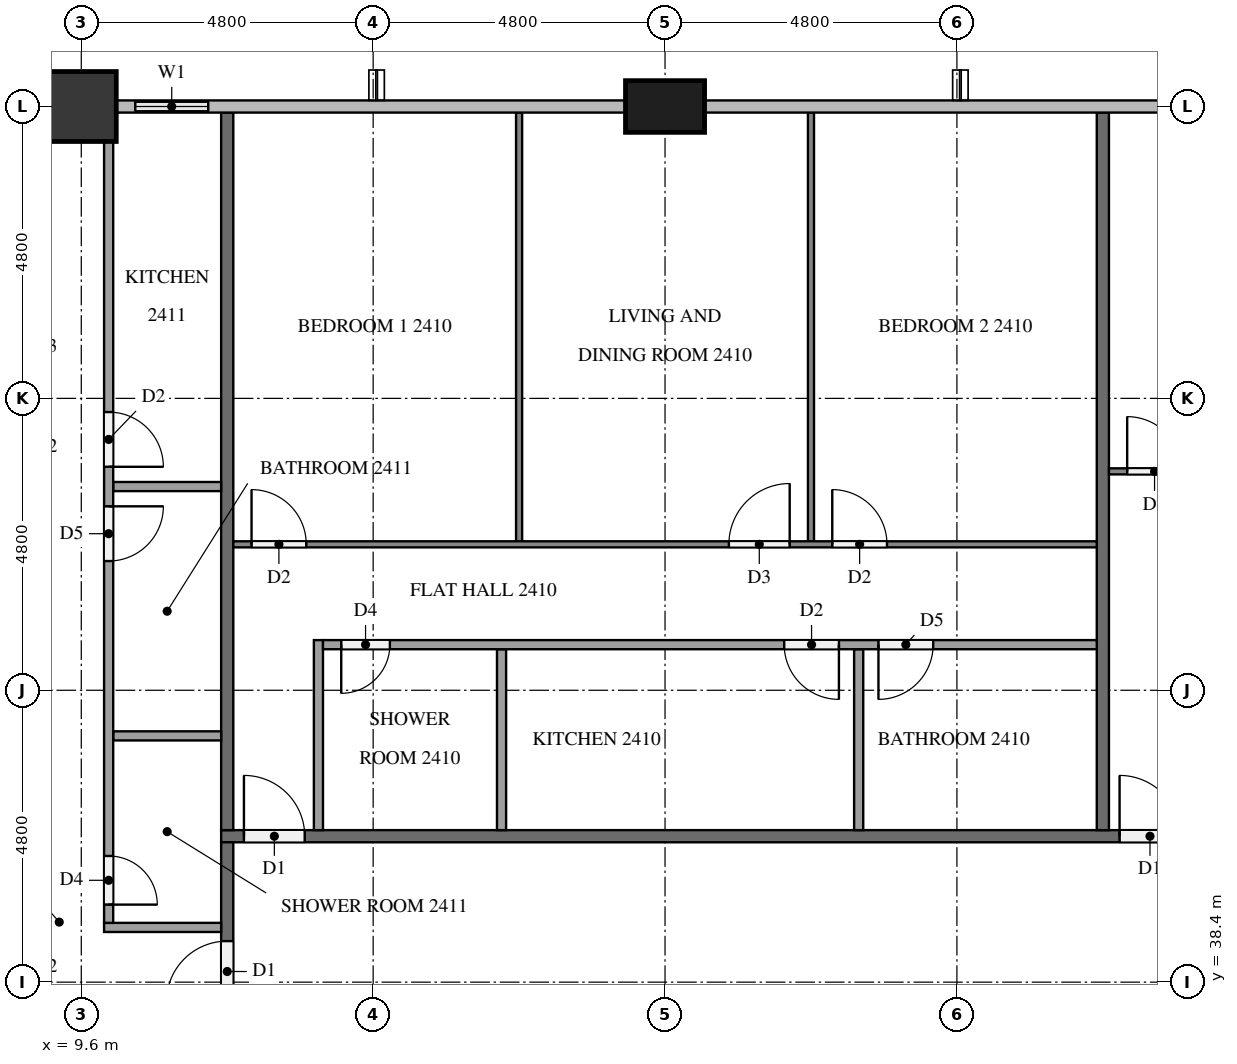
"""IFC4 building model, lengths in metres.
Left out: names, types, materials, properties, quantities, classifications, styles, units other than length and angle.
Written with IfcOpenShell. Run it as: python <this file> out.ifc"""

import sys

from ifc_helpers import new_model, si_unit, direction, frame, frame_2d, origin, origin_2d, place, context, subcontext, project, spatial, rectangle, extrude, element, fill, save


model = new_model("IFC4")
c1 = context("Model", 3, precision=1e-05, world=origin(), true_north=direction((0.0, 1.0)))
c2 = subcontext(c1, "Body", "Model", "MODEL_VIEW")
j1 = project(units=[si_unit("LENGTHUNIT", "METRE"), si_unit("PLANEANGLEUNIT", "RADIAN")], contexts=[c1])
p1 = place(None, origin())
s1 = spatial("IfcSite", under=j1, at=p1, CompositionType="ELEMENT")
p2 = place(p1, origin())
s2 = spatial("IfcBuilding", under=s1, at=p2, CompositionType="ELEMENT")
p3 = place(p2, frame((0.0, 0.0, 96.2)))
s3 = spatial("IfcBuildingStorey", under=s2, at=p3, CompositionType="ELEMENT", Elevation=96.2)
p4 = place(p3, frame((19.2, 52.8, 0.0), z_axis=(0.0, 0.0, 1.0), x_axis=(1.0, 0.0, 0.0)))
e1 = element("IfcColumn", 1, at=p4, inside=s3, PredefinedType="COLUMN", context=c2, shape_type="SweptSolid", body=[
    extrude(rectangle(XDim=1.3, YDim=0.85, at=origin_2d()), origin(), (0.0, 0.0, 1.0), 3.2),
])
p5 = place(p3, frame((9.6, 52.8, 0.0), z_axis=(0.0, 0.0, 1.0), x_axis=(1.0, 0.0, 0.0)))
e2 = element("IfcColumn", 2, at=p5, inside=s3, PredefinedType="COLUMN", context=c2, shape_type="SweptSolid", body=[
    extrude(rectangle(XDim=1.15, YDim=1.15, at=origin_2d()), origin(), (0.0, 0.0, 1.0), 3.2),
])
p6 = place(p3, frame((12.0, 52.8, 0.0), z_axis=(0.0, 0.0, 1.0), x_axis=(-1.0, 0.0, 0.0)))
e3 = element("IfcWall", 3, at=p6, inside=s3, PredefinedType="SOLIDWALL", context=c2, shape_type="SweptSolid", body=[
    extrude(rectangle(XDim=1.825, YDim=0.15, at=frame_2d((0.913, 0.0))), origin(), (0.0, 0.0, 1.0), 3.2),
])
p7 = place(p6, frame((0.312, 0.0, 0.9)))
e4 = element("IfcOpeningElement", 4, at=p7, cuts=e3, PredefinedType="OPENING", context=c2, shape_type="SweptSolid", body=[
    extrude(rectangle(XDim=1.2, YDim=1.4, at=frame_2d((0.6, 0.7))), frame((0.0, 0.085, 0.0), z_axis=(0.0, -1.0, 0.0), x_axis=(1.0, 0.0, 0.0)), (0.0, 0.0, 1.0), 0.17),
])
p8 = place(p3, frame((11.9, 40.8, 0.0), z_axis=(0.0, 0.0, 1.0), x_axis=(1.0, 0.0, 0.0)))
e5 = element("IfcWall", 5, at=p8, inside=s3, PredefinedType="PARTITIONING", context=c2, shape_type="SweptSolid", body=[
    extrude(rectangle(XDim=38.6, YDim=0.2, at=frame_2d((19.3, 0.0))), origin(), (0.0, 0.0, 1.0), 3.2),
])
p9 = place(p8, frame((31.575, 0.0, 0.0)))
e6 = element("IfcOpeningElement", 6, at=p9, cuts=e5, PredefinedType="OPENING", context=c2, shape_type="SweptSolid", body=[
    extrude(rectangle(XDim=1.0, YDim=2.1, at=frame_2d((0.5, 1.05))), frame((0.0, 0.11, 0.0), z_axis=(0.0, -1.0, 0.0), x_axis=(1.0, 0.0, 0.0)), (0.0, 0.0, 1.0), 0.22),
])
p10 = place(p8, frame((14.775, 0.0, 0.0)))
e7 = element("IfcOpeningElement", 7, at=p10, cuts=e5, PredefinedType="OPENING", context=c2, shape_type="SweptSolid", body=[
    extrude(rectangle(XDim=1.0, YDim=2.1, at=frame_2d((0.5, 1.05))), frame((0.0, 0.11, 0.0), z_axis=(0.0, -1.0, 0.0), x_axis=(1.0, 0.0, 0.0)), (0.0, 0.0, 1.0), 0.22),
])
p11 = place(p8, frame((0.375, 0.0, 0.0)))
e8 = element("IfcOpeningElement", 8, at=p11, cuts=e5, PredefinedType="OPENING", context=c2, shape_type="SweptSolid", body=[
    extrude(rectangle(XDim=1.0, YDim=2.1, at=frame_2d((0.5, 1.05))), frame((0.0, 0.11, 0.0), z_axis=(0.0, -1.0, 0.0), x_axis=(1.0, 0.0, 0.0)), (0.0, 0.0, 1.0), 0.22),
])
p12 = place(p3, frame((12.0, 37.9, 0.0), z_axis=(0.0, 0.0, 1.0), x_axis=(0.0, 1.0, 0.0)))
e9 = element("IfcWall", 9, at=p12, inside=s3, PredefinedType="PARTITIONING", context=c2, shape_type="SweptSolid", body=[
    extrude(rectangle(XDim=2.8, YDim=0.2, at=frame_2d((1.4, 0.0))), origin(), (0.0, 0.0, 1.0), 3.2),
])
p13 = place(p12, frame((0.175, 0.0, 0.0)))
e10 = element("IfcOpeningElement", 10, at=p13, cuts=e9, PredefinedType="OPENING", context=c2, shape_type="SweptSolid", body=[
    extrude(rectangle(XDim=1.0, YDim=2.1, at=frame_2d((0.5, 1.05))), frame((0.0, 0.11, 0.0), z_axis=(0.0, -1.0, 0.0), x_axis=(1.0, 0.0, 0.0)), (0.0, 0.0, 1.0), 0.22),
])
for number, where, z_axis, x_axis in (
    (11, (26.4, 52.7, 0.0), (0.0, 0.0, 1.0), (0.0, -1.0, 0.0)),
    (12, (12.0, 52.7, 0.0), (0.0, 0.0, 1.0), (0.0, -1.0, 0.0)),
):
    element("IfcWall", number, at=place(p3, frame(where, z_axis=z_axis, x_axis=x_axis)), inside=s3, PredefinedType="PARTITIONING", context=c2, shape_type="SweptSolid", body=[
        extrude(rectangle(XDim=11.8, YDim=0.2, at=frame_2d((5.9, 0.0))), origin(), (0.0, 0.0, 1.0), 3.2),
    ])
p14 = place(p3, frame((26.5, 46.8, 0.0), z_axis=(0.0, 0.0, 1.0), x_axis=(1.0, 0.0, 0.0)))
e13 = element("IfcWall", 13, at=p14, inside=s3, PredefinedType="PARTITIONING", context=c2, shape_type="SweptSolid", body=[
    extrude(rectangle(XDim=16.6, YDim=0.1, at=frame_2d((8.3, 0.0))), origin(), (0.0, 0.0, 1.0), 3.2),
])
p15 = place(p14, frame((0.3, 0.0, 0.0)))
e14 = element("IfcOpeningElement", 14, at=p15, cuts=e13, PredefinedType="OPENING", context=c2, shape_type="SweptSolid", body=[
    extrude(rectangle(XDim=0.9, YDim=2.1, at=frame_2d((0.45, 1.05))), frame((0.0, 0.06, 0.0), z_axis=(0.0, -1.0, 0.0), x_axis=(1.0, 0.0, 0.0)), (0.0, 0.0, 1.0), 0.12),
])
p16 = place(p14, frame((8.25, 0.0, 0.0)))
e15 = element("IfcOpeningElement", 15, at=p16, cuts=e13, PredefinedType="OPENING", context=c2, shape_type="SweptSolid", body=[
    extrude(rectangle(XDim=0.9, YDim=2.1, at=frame_2d((0.45, 1.05))), frame((0.0, 0.06, 0.0), z_axis=(0.0, -1.0, 0.0), x_axis=(1.0, 0.0, 0.0)), (0.0, 0.0, 1.0), 0.12),
])
p17 = place(p14, frame((9.85, 0.0, 0.0)))
e16 = element("IfcOpeningElement", 16, at=p17, cuts=e13, PredefinedType="OPENING", context=c2, shape_type="SweptSolid", body=[
    extrude(rectangle(XDim=1.0, YDim=2.1, at=frame_2d((0.5, 1.05))), frame((0.0, 0.06, 0.0), z_axis=(0.0, -1.0, 0.0), x_axis=(1.0, 0.0, 0.0)), (0.0, 0.0, 1.0), 0.12),
])
for number, where, z_axis, x_axis in (
    (17, (16.8, 45.65, 0.0), (0.0, 0.0, 1.0), (0.0, 1.0, 0.0)),
    (18, (21.6, 45.65, 0.0), (0.0, 0.0, 1.0), (0.0, 1.0, 0.0)),
):
    element("IfcWall", number, at=place(p3, frame(where, z_axis=z_axis, x_axis=x_axis)), inside=s3, PredefinedType="PARTITIONING", context=c2, shape_type="SweptSolid", body=[
        extrude(rectangle(XDim=7.05, YDim=0.1, at=frame_2d((3.525, 0.0))), origin(), (0.0, 0.0, 1.0), 3.2),
    ])
p18 = place(p3, frame((12.1, 45.6, 0.0), z_axis=(0.0, 0.0, 1.0), x_axis=(1.0, 0.0, 0.0)))
e19 = element("IfcWall", 19, at=p18, inside=s3, PredefinedType="PARTITIONING", context=c2, shape_type="SweptSolid", body=[
    extrude(rectangle(XDim=14.2, YDim=0.1, at=frame_2d((7.1, 0.0))), origin(), (0.0, 0.0, 1.0), 3.2),
])
p19 = place(p18, frame((0.3, 0.0, 0.0)))
e20 = element("IfcOpeningElement", 20, at=p19, cuts=e19, PredefinedType="OPENING", context=c2, shape_type="SweptSolid", body=[
    extrude(rectangle(XDim=0.9, YDim=2.1, at=frame_2d((0.45, 1.05))), frame((0.0, 0.06, 0.0), z_axis=(0.0, -1.0, 0.0), x_axis=(1.0, 0.0, 0.0)), (0.0, 0.0, 1.0), 0.12),
])
p20 = place(p18, frame((8.15, 0.0, 0.0)))
e21 = element("IfcOpeningElement", 21, at=p20, cuts=e19, PredefinedType="OPENING", context=c2, shape_type="SweptSolid", body=[
    extrude(rectangle(XDim=1.0, YDim=2.1, at=frame_2d((0.5, 1.05))), frame((0.0, 0.06, 0.0), z_axis=(0.0, -1.0, 0.0), x_axis=(1.0, 0.0, 0.0)), (0.0, 0.0, 1.0), 0.12),
])
p21 = place(p18, frame((9.85, 0.0, 0.0)))
e22 = element("IfcOpeningElement", 22, at=p21, cuts=e19, PredefinedType="OPENING", context=c2, shape_type="SweptSolid", body=[
    extrude(rectangle(XDim=0.9, YDim=2.1, at=frame_2d((0.45, 1.05))), frame((0.0, 0.06, 0.0), z_axis=(0.0, -1.0, 0.0), x_axis=(1.0, 0.0, 0.0)), (0.0, 0.0, 1.0), 0.12),
])
for number, where, z_axis, x_axis in (
    (23, (16.511, 40.9, 0.0), (0.0, 0.0, 1.0), (0.0, 1.0, 0.0)),
    (24, (22.385, 40.9, 0.0), (0.0, 0.0, 1.0), (0.0, 1.0, 0.0)),
):
    element("IfcWall", number, at=place(p3, frame(where, z_axis=z_axis, x_axis=x_axis)), inside=s3, PredefinedType="PARTITIONING", context=c2, shape_type="SweptSolid", body=[
        extrude(rectangle(XDim=2.975, YDim=0.15, at=frame_2d((1.488, 0.0))), origin(), (0.0, 0.0, 1.0), 3.2),
    ])
p22 = place(p3, frame((13.5, 40.9, 0.0), z_axis=(0.0, 0.0, 1.0), x_axis=(0.0, 1.0, 0.0)))
e25 = element("IfcWall", 25, at=p22, inside=s3, PredefinedType="PARTITIONING", context=c2, shape_type="SweptSolid", body=[
    extrude(rectangle(XDim=3.125, YDim=0.15, at=frame_2d((1.562, 0.0))), origin(), (0.0, 0.0, 1.0), 3.2),
])
p23 = place(p3, frame((26.3, 43.95, 0.0), z_axis=(0.0, 0.0, 1.0), x_axis=(-1.0, 0.0, 0.0)))
e26 = element("IfcWall", 26, at=p23, inside=s3, PredefinedType="PARTITIONING", context=c2, shape_type="SweptSolid", body=[
    extrude(rectangle(XDim=12.725, YDim=0.15, at=frame_2d((6.363, 0.0))), origin(), (0.0, 0.0, 1.0), 3.2),
])
p24 = place(p23, frame((11.625, 0.0, 0.0)))
e27 = element("IfcOpeningElement", 27, at=p24, cuts=e26, PredefinedType="OPENING", context=c2, shape_type="SweptSolid", body=[
    extrude(rectangle(XDim=0.8, YDim=2.1, at=frame_2d((0.4, 1.05))), frame((0.0, 0.085, 0.0), z_axis=(0.0, -1.0, 0.0), x_axis=(1.0, 0.0, 0.0)), (0.0, 0.0, 1.0), 0.17),
])
p25 = place(p23, frame((4.24, 0.0, 0.0)))
e28 = element("IfcOpeningElement", 28, at=p25, cuts=e26, PredefinedType="OPENING", context=c2, shape_type="SweptSolid", body=[
    extrude(rectangle(XDim=0.9, YDim=2.1, at=frame_2d((0.45, 1.05))), frame((0.0, 0.085, 0.0), z_axis=(0.0, -1.0, 0.0), x_axis=(1.0, 0.0, 0.0)), (0.0, 0.0, 1.0), 0.17),
])
p26 = place(p23, frame((2.69, 0.0, 0.0)))
e29 = element("IfcOpeningElement", 29, at=p26, cuts=e26, PredefinedType="OPENING", context=c2, shape_type="SweptSolid", body=[
    extrude(rectangle(XDim=0.9, YDim=2.1, at=frame_2d((0.45, 1.05))), frame((0.0, 0.085, 0.0), z_axis=(0.0, -1.0, 0.0), x_axis=(1.0, 0.0, 0.0)), (0.0, 0.0, 1.0), 0.17),
])
for number, where, z_axis, x_axis in (
    (30, (11.9, 42.45, 0.0), (0.0, 0.0, 1.0), (-1.0, 0.0, 0.0)),
    (31, (11.9, 46.55, 0.0), (0.0, 0.0, 1.0), (-1.0, 0.0, 0.0)),
):
    element("IfcWall", number, at=place(p3, frame(where, z_axis=z_axis, x_axis=x_axis)), inside=s3, PredefinedType="PARTITIONING", context=c2, shape_type="SweptSolid", body=[
        extrude(rectangle(XDim=1.775, YDim=0.15, at=frame_2d((0.887, 0.0))), origin(), (0.0, 0.0, 1.0), 3.2),
    ])
p27 = place(p3, frame((11.9, 39.3, 0.0), z_axis=(0.0, 0.0, 1.0), x_axis=(-1.0, 0.0, 0.0)))
e32 = element("IfcWall", 32, at=p27, inside=s3, PredefinedType="PARTITIONING", context=c2, shape_type="SweptSolid", body=[
    extrude(rectangle(XDim=1.925, YDim=0.15, at=frame_2d((0.962, 0.0))), origin(), (0.0, 0.0, 1.0), 3.2),
])
p28 = place(p3, frame((10.05, 52.225, 0.0), z_axis=(0.0, 0.0, 1.0), x_axis=(0.0, -1.0, 0.0)))
e33 = element("IfcWall", 33, at=p28, inside=s3, PredefinedType="PARTITIONING", context=c2, shape_type="SweptSolid", body=[
    extrude(rectangle(XDim=12.85, YDim=0.15, at=frame_2d((6.425, 0.0))), origin(), (0.0, 0.0, 1.0), 3.2),
])
p29 = place(p28, frame((11.75, 0.0, 0.0)))
e34 = element("IfcOpeningElement", 34, at=p29, cuts=e33, PredefinedType="OPENING", context=c2, shape_type="SweptSolid", body=[
    extrude(rectangle(XDim=0.8, YDim=2.1, at=frame_2d((0.4, 1.05))), frame((0.0, 0.085, 0.0), z_axis=(0.0, -1.0, 0.0), x_axis=(1.0, 0.0, 0.0)), (0.0, 0.0, 1.0), 0.17),
])
p30 = place(p28, frame((6.0, 0.0, 0.0)))
e35 = element("IfcOpeningElement", 35, at=p30, cuts=e33, PredefinedType="OPENING", context=c2, shape_type="SweptSolid", body=[
    extrude(rectangle(XDim=0.9, YDim=2.1, at=frame_2d((0.45, 1.05))), frame((0.0, 0.085, 0.0), z_axis=(0.0, -1.0, 0.0), x_axis=(1.0, 0.0, 0.0)), (0.0, 0.0, 1.0), 0.17),
])
p31 = place(p28, frame((4.45, 0.0, 0.0)))
e36 = element("IfcOpeningElement", 36, at=p31, cuts=e33, PredefinedType="OPENING", context=c2, shape_type="SweptSolid", body=[
    extrude(rectangle(XDim=0.9, YDim=2.1, at=frame_2d((0.45, 1.05))), frame((0.0, 0.085, 0.0), z_axis=(0.0, -1.0, 0.0), x_axis=(1.0, 0.0, 0.0)), (0.0, 0.0, 1.0), 0.17),
])
p32 = place(p7, origin())
e37 = element("IfcWindow", 37, at=p32, inside=s3, PartitioningType="SINGLE_PANEL", PredefinedType="WINDOW", context=c2, shape_type="SweptSolid", body=[
    extrude(rectangle(XDim=1.2, YDim=1.4, at=frame_2d((0.6, 0.7))), frame((0.0, 0.03, 0.0), z_axis=(0.0, -1.0, 0.0), x_axis=(1.0, 0.0, 0.0)), (0.0, 0.0, 1.0), 0.06),
])
fill(e4, e37)
p33 = place(p10, origin())
e38 = element("IfcDoor", 38, at=p33, inside=s3, OperationType="SINGLE_SWING_LEFT", PredefinedType="DOOR", context=c2, shape_type="SweptSolid", body=[
    extrude(rectangle(XDim=1.0, YDim=2.1, at=frame_2d((0.5, 1.05))), frame((0.0, 0.025, 0.0), z_axis=(0.0, -1.0, 0.0), x_axis=(1.0, 0.0, 0.0)), (0.0, 0.0, 1.0), 0.05),
])
fill(e7, e38)
p34 = place(p11, origin())
e39 = element("IfcDoor", 39, at=p34, inside=s3, OperationType="SINGLE_SWING_LEFT", PredefinedType="DOOR", context=c2, shape_type="SweptSolid", body=[
    extrude(rectangle(XDim=1.0, YDim=2.1, at=frame_2d((0.5, 1.05))), frame((0.0, 0.025, 0.0), z_axis=(0.0, -1.0, 0.0), x_axis=(1.0, 0.0, 0.0)), (0.0, 0.0, 1.0), 0.05),
])
fill(e8, e39)
p35 = place(p13, origin())
e40 = element("IfcDoor", 40, at=p35, inside=s3, OperationType="SINGLE_SWING_LEFT", PredefinedType="DOOR", context=c2, shape_type="SweptSolid", body=[
    extrude(rectangle(XDim=1.0, YDim=2.1, at=frame_2d((0.5, 1.05))), frame((0.0, 0.025, 0.0), z_axis=(0.0, -1.0, 0.0), x_axis=(1.0, 0.0, 0.0)), (0.0, 0.0, 1.0), 0.05),
])
fill(e10, e40)
p36 = place(p15, origin())
e41 = element("IfcDoor", 41, at=p36, inside=s3, OperationType="SINGLE_SWING_LEFT", PredefinedType="DOOR", context=c2, shape_type="SweptSolid", body=[
    extrude(rectangle(XDim=0.9, YDim=2.1, at=frame_2d((0.45, 1.05))), frame((0.0, 0.025, 0.0), z_axis=(0.0, -1.0, 0.0), x_axis=(1.0, 0.0, 0.0)), (0.0, 0.0, 1.0), 0.05),
])
fill(e14, e41)
p37 = place(p19, origin())
e42 = element("IfcDoor", 42, at=p37, inside=s3, OperationType="SINGLE_SWING_LEFT", PredefinedType="DOOR", context=c2, shape_type="SweptSolid", body=[
    extrude(rectangle(XDim=0.9, YDim=2.1, at=frame_2d((0.45, 1.05))), frame((0.0, 0.025, 0.0), z_axis=(0.0, -1.0, 0.0), x_axis=(1.0, 0.0, 0.0)), (0.0, 0.0, 1.0), 0.05),
])
fill(e20, e42)
p38 = place(p20, origin())
e43 = element("IfcDoor", 43, at=p38, inside=s3, OperationType="SINGLE_SWING_RIGHT", PredefinedType="DOOR", context=c2, shape_type="SweptSolid", body=[
    extrude(rectangle(XDim=1.0, YDim=2.1, at=frame_2d((0.5, 1.05))), frame((0.0, 0.025, 0.0), z_axis=(0.0, -1.0, 0.0), x_axis=(1.0, 0.0, 0.0)), (0.0, 0.0, 1.0), 0.05),
])
fill(e21, e43)
p39 = place(p21, origin())
e44 = element("IfcDoor", 44, at=p39, inside=s3, OperationType="SINGLE_SWING_LEFT", PredefinedType="DOOR", context=c2, shape_type="SweptSolid", body=[
    extrude(rectangle(XDim=0.9, YDim=2.1, at=frame_2d((0.45, 1.05))), frame((0.0, 0.025, 0.0), z_axis=(0.0, -1.0, 0.0), x_axis=(1.0, 0.0, 0.0)), (0.0, 0.0, 1.0), 0.05),
])
fill(e22, e44)
p40 = place(p24, origin())
e45 = element("IfcDoor", 45, at=p40, inside=s3, OperationType="SINGLE_SWING_RIGHT", PredefinedType="DOOR", context=c2, shape_type="SweptSolid", body=[
    extrude(rectangle(XDim=0.8, YDim=2.1, at=frame_2d((0.4, 1.05))), frame((0.0, 0.025, 0.0), z_axis=(0.0, -1.0, 0.0), x_axis=(1.0, 0.0, 0.0)), (0.0, 0.0, 1.0), 0.05),
])
fill(e27, e45)
p41 = place(p25, origin())
e46 = element("IfcDoor", 46, at=p41, inside=s3, OperationType="SINGLE_SWING_LEFT", PredefinedType="DOOR", context=c2, shape_type="SweptSolid", body=[
    extrude(rectangle(XDim=0.9, YDim=2.1, at=frame_2d((0.45, 1.05))), frame((0.0, 0.025, 0.0), z_axis=(0.0, -1.0, 0.0), x_axis=(1.0, 0.0, 0.0)), (0.0, 0.0, 1.0), 0.05),
])
fill(e28, e46)
p42 = place(p26, origin())
e47 = element("IfcDoor", 47, at=p42, inside=s3, OperationType="SINGLE_SWING_RIGHT", PredefinedType="DOOR", context=c2, shape_type="SweptSolid", body=[
    extrude(rectangle(XDim=0.9, YDim=2.1, at=frame_2d((0.45, 1.05))), frame((0.0, 0.025, 0.0), z_axis=(0.0, -1.0, 0.0), x_axis=(1.0, 0.0, 0.0)), (0.0, 0.0, 1.0), 0.05),
])
fill(e29, e47)
p43 = place(p29, origin())
e48 = element("IfcDoor", 48, at=p43, inside=s3, OperationType="SINGLE_SWING_RIGHT", PredefinedType="DOOR", context=c2, shape_type="SweptSolid", body=[
    extrude(rectangle(XDim=0.8, YDim=2.1, at=frame_2d((0.4, 1.05))), frame((0.0, 0.025, 0.0), z_axis=(0.0, -1.0, 0.0), x_axis=(1.0, 0.0, 0.0)), (0.0, 0.0, 1.0), 0.05),
])
fill(e34, e48)
p44 = place(p30, origin())
e49 = element("IfcDoor", 49, at=p44, inside=s3, OperationType="SINGLE_SWING_LEFT", PredefinedType="DOOR", context=c2, shape_type="SweptSolid", body=[
    extrude(rectangle(XDim=0.9, YDim=2.1, at=frame_2d((0.45, 1.05))), frame((0.0, 0.025, 0.0), z_axis=(0.0, -1.0, 0.0), x_axis=(1.0, 0.0, 0.0)), (0.0, 0.0, 1.0), 0.05),
])
fill(e35, e49)
p45 = place(p31, origin())
e50 = element("IfcDoor", 50, at=p45, inside=s3, OperationType="SINGLE_SWING_RIGHT", PredefinedType="DOOR", context=c2, shape_type="SweptSolid", body=[
    extrude(rectangle(XDim=0.9, YDim=2.1, at=frame_2d((0.45, 1.05))), frame((0.0, 0.025, 0.0), z_axis=(0.0, -1.0, 0.0), x_axis=(1.0, 0.0, 0.0)), (0.0, 0.0, 1.0), 0.05),
])
fill(e36, e50)
save(model, sys.argv[1])
